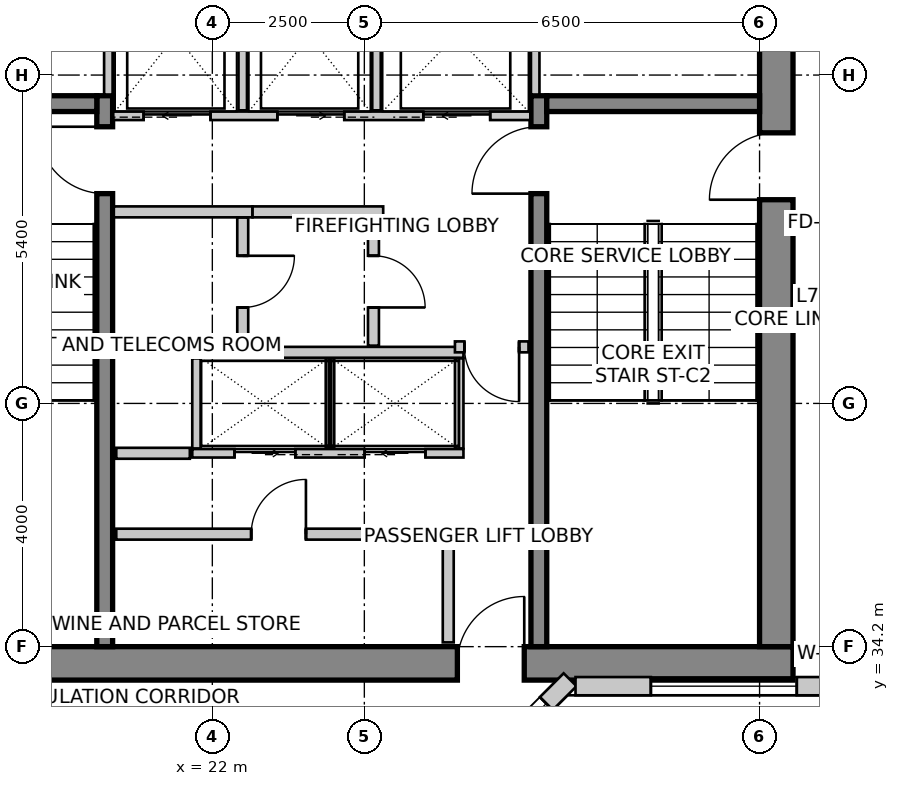
"""IFC4 building model, lengths in metres.
Left out: names, types, materials, properties, quantities, classifications, styles, units other than length and angle.
Written with IfcOpenShell. Run it as: python <this file> out.ifc"""

import sys

from ifc_helpers import new_model, si_unit, direction, frame, frame_2d, origin, place, context, subcontext, project, spatial, rectangle, extrude, source, transform, mapped, element, fill, save


model = new_model("IFC4")
c1 = context("Model", 3, precision=1e-05, world=origin(), true_north=direction((0.0, 1.0)))
c2 = subcontext(c1, "Body", "Model", "MODEL_VIEW")
j1 = project(units=[si_unit("LENGTHUNIT", "METRE"), si_unit("PLANEANGLEUNIT", "RADIAN")], contexts=[c1])
p1 = place(None, origin())
s1 = spatial("IfcSite", under=j1, at=p1, CompositionType="ELEMENT")
p2 = place(p1, origin())
s2 = spatial("IfcBuilding", under=s1, at=p2, CompositionType="ELEMENT")
p3 = place(p2, frame((0.0, 0.0, 288.9)))
s3 = spatial("IfcBuildingStorey", under=s2, at=p3, CompositionType="ELEMENT", Elevation=288.9)
p4 = place(p3, frame((16.05, 33.925, 0.0), z_axis=(0.0, 0.0, 1.0), x_axis=(1.0, 0.0, 0.0)))
e1 = element("IfcWall", 1, at=p4, inside=s3, PredefinedType="SHEAR", context=c2, shape_type="SweptSolid", body=[
    extrude(rectangle(XDim=15.5, YDim=0.55, at=frame_2d((7.75, 0.0))), origin(), (0.0, 0.0, 1.0), 3.6),
])
m1 = source(origin(), c2, "Body", "SweptSolid", [
    extrude(rectangle(XDim=1.1, YDim=2.15, at=frame_2d((0.55, 1.075))), frame((0.0, 0.285, 0.0), z_axis=(0.0, -1.0, 0.0), x_axis=(1.0, 0.0, 0.0)), (0.0, 0.0, 1.0), 0.57),
])
p5 = place(p4, frame((9.98, 0.0, 0.0)))
e2 = element("IfcOpeningElement", 2, at=p5, cuts=e1, PredefinedType="OPENING", context=c2, shape_type="MappedRepresentation", body=[
    mapped(m1, transform((0.0, 0.0, 0.0), scale=1.0)),
])
p6 = place(p3, frame((31.275, 34.2, 0.0), z_axis=(0.0, 0.0, 1.0), x_axis=(0.0, 1.0, 0.0)))
e3 = element("IfcWall", 3, at=p6, inside=s3, PredefinedType="SHEAR", context=c2, shape_type="SweptSolid", body=[
    extrude(rectangle(XDim=11.4, YDim=0.55, at=frame_2d((5.7, 0.0))), origin(), (0.0, 0.0, 1.0), 3.6),
])
p7 = place(p6, frame((7.35, 0.0, 0.0)))
e4 = element("IfcOpeningElement", 4, at=p7, cuts=e3, PredefinedType="OPENING", context=c2, shape_type="MappedRepresentation", body=[
    mapped(m1, transform((0.0, 0.0, 0.0), scale=1.0)),
])
p8 = place(p3, frame((20.23, 34.2, 0.0), z_axis=(0.0, 0.0, 1.0), x_axis=(0.0, 1.0, 0.0)))
e5 = element("IfcWall", 5, at=p8, inside=s3, PredefinedType="SHEAR", context=c2, shape_type="SweptSolid", body=[
    extrude(rectangle(XDim=9.06, YDim=0.26, at=frame_2d((4.53, 0.0))), origin(), (0.0, 0.0, 1.0), 3.6),
])
m2 = source(origin(), c2, "Body", "SweptSolid", [
    extrude(rectangle(XDim=1.1, YDim=2.15, at=frame_2d((0.55, 1.075))), frame((0.0, 0.14, 0.0), z_axis=(0.0, -1.0, 0.0), x_axis=(1.0, 0.0, 0.0)), (0.0, 0.0, 1.0), 0.28),
])
p9 = place(p8, frame((7.45, 0.0, 0.0)))
e6 = element("IfcOpeningElement", 6, at=p9, cuts=e5, PredefinedType="OPENING", context=c2, shape_type="MappedRepresentation", body=[
    mapped(m2, transform((0.0, 0.0, 0.0), scale=1.0)),
])
p10 = place(p3, frame((27.37, 34.2, 0.0), z_axis=(0.0, 0.0, 1.0), x_axis=(0.0, 1.0, 0.0)))
e7 = element("IfcWall", 7, at=p10, inside=s3, PredefinedType="SHEAR", context=c2, shape_type="SweptSolid", body=[
    extrude(rectangle(XDim=9.06, YDim=0.26, at=frame_2d((4.53, 0.0))), origin(), (0.0, 0.0, 1.0), 3.6),
])
p11 = place(p10, frame((7.45, 0.0, 0.0)))
e8 = element("IfcOpeningElement", 8, at=p11, cuts=e7, PredefinedType="OPENING", context=c2, shape_type="MappedRepresentation", body=[
    mapped(m2, transform((0.0, 0.0, 0.0), scale=1.0)),
])
for number, where, z_axis, x_axis in (
    (9, (16.6, 43.13, 0.0), (0.0, 0.0, 1.0), (1.0, 0.0, 0.0)),
    (10, (27.5, 43.13, 0.0), (0.0, 0.0, 1.0), (1.0, 0.0, 0.0)),
):
    element("IfcWall", number, at=place(p3, frame(where, z_axis=z_axis, x_axis=x_axis)), inside=s3, PredefinedType="SHEAR", context=c2, shape_type="SweptSolid", body=[
        extrude(rectangle(XDim=3.5, YDim=0.26, at=frame_2d((1.75, 0.0))), origin(), (0.0, 0.0, 1.0), 3.6),
    ])
p12 = place(p3, frame((25.828, 31.6, 0.0), z_axis=(0.0, 0.0, 1.0), x_axis=(0.707106781187, 0.707106781187, 0.0)))
e11 = element("IfcWall", 11, at=p12, inside=s3, PredefinedType="SOLIDWALL", context=c2, shape_type="SweptSolid", body=[
    extrude(rectangle(XDim=2.907, YDim=0.3, at=frame_2d((1.454, 0.0))), origin(), (0.0, 0.0, 1.0), 3.35),
])
m3 = source(origin(), c2, "Body", "SweptSolid", [
    extrude(rectangle(XDim=1.8, YDim=2.1, at=frame_2d((0.9, 1.05))), frame((0.0, 0.16, 0.0), z_axis=(0.0, -1.0, 0.0), x_axis=(1.0, 0.0, 0.0)), (0.0, 0.0, 1.0), 0.32),
])
p13 = place(p12, frame((0.554, 0.0, 0.85)))
e12 = element("IfcOpeningElement", 12, at=p13, cuts=e11, PredefinedType="OPENING", context=c2, shape_type="MappedRepresentation", body=[
    mapped(m3, transform((0.0, 0.0, 0.0), scale=1.0)),
])
p14 = place(p3, frame((27.973, 33.55, 0.0), z_axis=(0.0, 0.0, 1.0), x_axis=(1.0, 0.0, 0.0)))
e13 = element("IfcWall", 13, at=p14, inside=s3, PredefinedType="SOLIDWALL", context=c2, shape_type="SweptSolid", body=[
    extrude(rectangle(XDim=9.115, YDim=0.3, at=frame_2d((4.558, 0.0))), origin(), (0.0, 0.0, 1.0), 3.35),
])
m4 = source(origin(), c2, "Body", "SweptSolid", [
    extrude(rectangle(XDim=2.4, YDim=2.2, at=frame_2d((1.2, 1.1))), frame((0.0, 0.16, 0.0), z_axis=(0.0, -1.0, 0.0), x_axis=(1.0, 0.0, 0.0)), (0.0, 0.0, 1.0), 0.32),
])
p15 = place(p14, frame((1.239, 0.0, 0.85)))
e14 = element("IfcOpeningElement", 14, at=p15, cuts=e13, PredefinedType="OPENING", context=c2, shape_type="MappedRepresentation", body=[
    mapped(m4, transform((0.0, 0.0, 0.0), scale=1.0)),
])
m5 = source(origin(), c2, "Body", "SweptSolid", [
    extrude(rectangle(XDim=2.1, YDim=2.0, at=frame_2d((1.05, 1.0))), frame((0.0, 0.16, 0.0), z_axis=(0.0, -1.0, 0.0), x_axis=(1.0, 0.0, 0.0)), (0.0, 0.0, 1.0), 0.32),
])
p16 = place(p14, frame((5.626, 0.0, 0.85)))
e15 = element("IfcOpeningElement", 15, at=p16, cuts=e13, PredefinedType="OPENING", context=c2, shape_type="MappedRepresentation", body=[
    mapped(m5, transform((0.0, 0.0, 0.0), scale=1.0)),
])
p17 = place(p3, frame((20.37, 42.93, 0.0), z_axis=(0.0, 0.0, 1.0), x_axis=(1.0, 0.0, 0.0)))
e16 = element("IfcWall", 16, at=p17, inside=s3, PredefinedType="SOLIDWALL", context=c2, shape_type="SweptSolid", body=[
    extrude(rectangle(XDim=6.86, YDim=0.14, at=frame_2d((3.43, 0.0))), origin(), (0.0, 0.0, 1.0), 3.35),
])
m6 = source(origin(), c2, "Body", "SweptSolid", [
    extrude(rectangle(XDim=1.1, YDim=2.15, at=frame_2d((0.55, 1.075))), frame((0.0, 0.08, 0.0), z_axis=(0.0, -1.0, 0.0), x_axis=(1.0, 0.0, 0.0)), (0.0, 0.0, 1.0), 0.16),
])
p18 = place(p17, frame((0.5, 0.0, 0.0)))
e17 = element("IfcOpeningElement", 17, at=p18, cuts=e16, PredefinedType="OPENING", context=c2, shape_type="MappedRepresentation", body=[
    mapped(m6, transform((0.0, 0.0, 0.0), scale=1.0)),
])
p19 = place(p17, frame((2.7, 0.0, 0.0)))
e18 = element("IfcOpeningElement", 18, at=p19, cuts=e16, PredefinedType="OPENING", context=c2, shape_type="MappedRepresentation", body=[
    mapped(m6, transform((0.0, 0.0, 0.0), scale=1.0)),
])
p20 = place(p17, frame((5.1, 0.0, 0.0)))
e19 = element("IfcOpeningElement", 19, at=p20, cuts=e16, PredefinedType="OPENING", context=c2, shape_type="MappedRepresentation", body=[
    mapped(m6, transform((0.0, 0.0, 0.0), scale=1.0)),
])
for number, where, z_axis, x_axis in (
    (20, (20.29, 43.28, 0.0), (0.0, 0.0, 1.0), (0.0, 1.0, 0.0)),
    (21, (27.31, 43.28, 0.0), (0.0, 0.0, 1.0), (0.0, 1.0, 0.0)),
):
    element("IfcWall", number, at=place(p3, frame(where, z_axis=z_axis, x_axis=x_axis)), inside=s3, PredefinedType="SOLIDWALL", context=c2, shape_type="SweptSolid", body=[
        extrude(rectangle(XDim=2.3, YDim=0.14, at=frame_2d((1.15, 0.0))), origin(), (0.0, 0.0, 1.0), 3.35),
    ])
for number, where, z_axis, x_axis in (
    (22, (22.5, 43.02, 0.0), (0.0, 0.0, 1.0), (0.0, 1.0, 0.0)),
    (23, (24.7, 43.02, 0.0), (0.0, 0.0, 1.0), (0.0, 1.0, 0.0)),
):
    element("IfcWall", number, at=place(p3, frame(where, z_axis=z_axis, x_axis=x_axis)), inside=s3, PredefinedType="SOLIDWALL", context=c2, shape_type="SweptSolid", body=[
        extrude(rectangle(XDim=2.56, YDim=0.14, at=frame_2d((1.28, 0.0))), origin(), (0.0, 0.0, 1.0), 3.35),
    ])
p21 = place(p3, frame((21.67, 37.38, 0.0), z_axis=(0.0, 0.0, 1.0), x_axis=(1.0, 0.0, 0.0)))
e24 = element("IfcWall", 24, at=p21, inside=s3, PredefinedType="SOLIDWALL", context=c2, shape_type="SweptSolid", body=[
    extrude(rectangle(XDim=4.46, YDim=0.14, at=frame_2d((2.23, 0.0))), origin(), (0.0, 0.0, 1.0), 3.35),
])
m7 = source(origin(), c2, "Body", "SweptSolid", [
    extrude(rectangle(XDim=1.0, YDim=2.15, at=frame_2d((0.5, 1.075))), frame((0.0, 0.08, 0.0), z_axis=(0.0, -1.0, 0.0), x_axis=(1.0, 0.0, 0.0)), (0.0, 0.0, 1.0), 0.16),
])
p22 = place(p21, frame((0.695, 0.0, 0.0)))
e25 = element("IfcOpeningElement", 25, at=p22, cuts=e24, PredefinedType="OPENING", context=c2, shape_type="MappedRepresentation", body=[
    mapped(m7, transform((0.0, 0.0, 0.0), scale=1.0)),
])
p23 = place(p21, frame((2.835, 0.0, 0.0)))
e26 = element("IfcOpeningElement", 26, at=p23, cuts=e24, PredefinedType="OPENING", context=c2, shape_type="MappedRepresentation", body=[
    mapped(m7, transform((0.0, 0.0, 0.0), scale=1.0)),
])
p24 = place(p3, frame((21.67, 39.04, 0.0), z_axis=(0.0, 0.0, 1.0), x_axis=(1.0, 0.0, 0.0)))
e27 = element("IfcWall", 27, at=p24, inside=s3, PredefinedType="SOLIDWALL", context=c2, shape_type="SweptSolid", body=[
    extrude(rectangle(XDim=4.46, YDim=0.18, at=frame_2d((2.23, 0.0))), origin(), (0.0, 0.0, 1.0), 3.35),
])
for number, where, z_axis, x_axis in (
    (28, (26.06, 37.46, 0.0), (0.0, 0.0, 1.0), (0.0, 1.0, 0.0)),
    (29, (21.74, 37.46, 0.0), (0.0, 0.0, 1.0), (0.0, 1.0, 0.0)),
    (30, (23.935, 37.46, 0.0), (0.0, 0.0, 1.0), (0.0, 1.0, 0.0)),
):
    element("IfcWall", number, at=place(p3, frame(where, z_axis=z_axis, x_axis=x_axis)), inside=s3, PredefinedType="SOLIDWALL", context=c2, shape_type="SweptSolid", body=[
        extrude(rectangle(XDim=1.48, YDim=0.14, at=frame_2d((0.74, 0.0))), origin(), (0.0, 0.0, 1.0), 3.35),
    ])
p25 = place(p3, frame((22.66, 41.35, 0.0), z_axis=(0.0, 0.0, 1.0), x_axis=(-1.0, 0.0, 0.0)))
e31 = element("IfcWall", 31, at=p25, inside=s3, PredefinedType="PARTITIONING", context=c2, shape_type="SweptSolid", body=[
    extrude(rectangle(XDim=2.28, YDim=0.18, at=frame_2d((1.14, 0.0))), origin(), (0.0, 0.0, 1.0), 3.35),
])
p26 = place(p3, frame((24.81, 41.35, 0.0), z_axis=(0.0, 0.0, 1.0), x_axis=(-1.0, 0.0, 0.0)))
e32 = element("IfcWall", 32, at=p26, inside=s3, PredefinedType="PARTITIONING", context=c2, shape_type="SweptSolid", body=[
    extrude(rectangle(XDim=2.148, YDim=0.18, at=frame_2d((1.074, 0.0))), origin(), (0.0, 0.0, 1.0), 3.35),
])
p27 = place(p3, frame((22.5, 41.256, 0.0), z_axis=(0.0, 0.0, 1.0), x_axis=(0.0, -1.0, 0.0)))
e33 = element("IfcWall", 33, at=p27, inside=s3, PredefinedType="PARTITIONING", context=c2, shape_type="SweptSolid", body=[
    extrude(rectangle(XDim=2.106, YDim=0.18, at=frame_2d((1.053, 0.0))), origin(), (0.0, 0.0, 1.0), 3.35),
])
m8 = source(origin(), c2, "Body", "SweptSolid", [
    extrude(rectangle(XDim=0.85, YDim=2.15, at=frame_2d((0.425, 1.075))), frame((0.0, 0.1, 0.0), z_axis=(0.0, -1.0, 0.0), x_axis=(1.0, 0.0, 0.0)), (0.0, 0.0, 1.0), 0.2),
])
p28 = place(p27, frame((0.628, 0.0, 0.0)))
e34 = element("IfcOpeningElement", 34, at=p28, cuts=e33, PredefinedType="OPENING", context=c2, shape_type="MappedRepresentation", body=[
    mapped(m8, transform((0.0, 0.0, 0.0), scale=1.0)),
])
p29 = place(p3, frame((21.63, 37.38, 0.0), z_axis=(0.0, 0.0, 1.0), x_axis=(-1.0, 0.0, 0.0)))
e35 = element("IfcWall", 35, at=p29, inside=s3, PredefinedType="PARTITIONING", context=c2, shape_type="SweptSolid", body=[
    extrude(rectangle(XDim=1.21, YDim=0.18, at=frame_2d((0.605, 0.0))), origin(), (0.0, 0.0, 1.0), 3.35),
])
p30 = place(p3, frame((24.65, 41.256, 0.0), z_axis=(0.0, 0.0, 1.0), x_axis=(0.0, -1.0, 0.0)))
e36 = element("IfcWall", 36, at=p30, inside=s3, PredefinedType="PARTITIONING", context=c2, shape_type="SweptSolid", body=[
    extrude(rectangle(XDim=2.106, YDim=0.18, at=frame_2d((1.053, 0.0))), origin(), (0.0, 0.0, 1.0), 3.35),
])
p31 = place(p30, frame((0.628, 0.0, 0.0)))
e37 = element("IfcOpeningElement", 37, at=p31, cuts=e36, PredefinedType="OPENING", context=c2, shape_type="MappedRepresentation", body=[
    mapped(m8, transform((0.0, 0.0, 0.0), scale=1.0)),
])
p32 = place(p3, frame((27.2, 39.13, 0.0), z_axis=(0.0, 0.0, 1.0), x_axis=(-1.0, 0.0, 0.0)))
e38 = element("IfcWall", 38, at=p32, inside=s3, PredefinedType="PARTITIONING", context=c2, shape_type="SweptSolid", body=[
    extrude(rectangle(XDim=1.21, YDim=0.18, at=frame_2d((0.605, 0.0))), origin(), (0.0, 0.0, 1.0), 3.35),
])
m9 = source(origin(), c2, "Body", "SweptSolid", [
    extrude(rectangle(XDim=0.9, YDim=2.15, at=frame_2d((0.45, 1.075))), frame((0.0, 0.1, 0.0), z_axis=(0.0, -1.0, 0.0), x_axis=(1.0, 0.0, 0.0)), (0.0, 0.0, 1.0), 0.2),
])
p33 = place(p32, frame((0.155, 0.0, 0.0)))
e39 = element("IfcOpeningElement", 39, at=p33, cuts=e38, PredefinedType="OPENING", context=c2, shape_type="MappedRepresentation", body=[
    mapped(m9, transform((0.0, 0.0, 0.0), scale=1.0)),
])
p34 = place(p3, frame((20.42, 36.05, 0.0), z_axis=(0.0, 0.0, 1.0), x_axis=(1.0, 0.0, 0.0)))
e40 = element("IfcWall", 40, at=p34, inside=s3, PredefinedType="PARTITIONING", context=c2, shape_type="SweptSolid", body=[
    extrude(rectangle(XDim=5.46, YDim=0.18, at=frame_2d((2.73, 0.0))), origin(), (0.0, 0.0, 1.0), 3.35),
])
p35 = place(p34, frame((2.219, 0.0, 0.0)))
e41 = element("IfcOpeningElement", 41, at=p35, cuts=e40, PredefinedType="OPENING", context=c2, shape_type="MappedRepresentation", body=[
    mapped(m9, transform((0.0, 0.0, 0.0), scale=1.0)),
])
p36 = place(p3, frame((25.88, 35.956, 0.0), z_axis=(0.0, 0.0, 1.0), x_axis=(0.0, -1.0, 0.0)))
e42 = element("IfcWall", 42, at=p36, inside=s3, PredefinedType="PARTITIONING", context=c2, shape_type="SweptSolid", body=[
    extrude(rectangle(XDim=1.686, YDim=0.18, at=frame_2d((0.843, 0.0))), origin(), (0.0, 0.0, 1.0), 2.642),
])
m10 = source(origin(), c2, "Body", "SweptSolid", [
    extrude(rectangle(XDim=1.8, YDim=2.1, at=frame_2d((0.9, 1.05))), frame((0.0, -0.015, 0.0), z_axis=(0.0, -1.0, 0.0), x_axis=(1.0, 0.0, 0.0)), (0.0, 0.0, 1.0), 0.06),
])
p37 = place(p13, origin())
e43 = element("IfcWindow", 43, at=p37, inside=s3, PartitioningType="SINGLE_PANEL", PredefinedType="WINDOW", context=c2, shape_type="MappedRepresentation", body=[
    mapped(m10, transform((0.0, 0.0, 0.0), scale=1.0)),
])
fill(e12, e43)
m11 = source(origin(), c2, "Body", "SweptSolid", [
    extrude(rectangle(XDim=2.4, YDim=2.2, at=frame_2d((1.2, 1.1))), frame((0.0, -0.015, 0.0), z_axis=(0.0, -1.0, 0.0), x_axis=(1.0, 0.0, 0.0)), (0.0, 0.0, 1.0), 0.06),
])
p38 = place(p15, origin())
e44 = element("IfcWindow", 44, at=p38, inside=s3, PartitioningType="SINGLE_PANEL", PredefinedType="WINDOW", context=c2, shape_type="MappedRepresentation", body=[
    mapped(m11, transform((0.0, 0.0, 0.0), scale=1.0)),
])
fill(e14, e44)
m12 = source(origin(), c2, "Body", "SweptSolid", [
    extrude(rectangle(XDim=1.1, YDim=2.15, at=frame_2d((0.55, 1.075))), frame((0.0, 0.025, 0.0), z_axis=(0.0, -1.0, 0.0), x_axis=(1.0, 0.0, 0.0)), (0.0, 0.0, 1.0), 0.05),
])
p39 = place(p18, origin())
e45 = element("IfcDoor", 45, at=p39, inside=s3, OperationType="SLIDING_TO_LEFT", PredefinedType="DOOR", context=c2, shape_type="MappedRepresentation", body=[
    mapped(m12, transform((0.0, 0.0, 0.0), scale=1.0)),
])
fill(e17, e45)
p40 = place(p19, origin())
e46 = element("IfcDoor", 46, at=p40, inside=s3, OperationType="SLIDING_TO_RIGHT", PredefinedType="DOOR", context=c2, shape_type="MappedRepresentation", body=[
    mapped(m12, transform((0.0, 0.0, 0.0), scale=1.0)),
])
fill(e18, e46)
m13 = source(origin(), c2, "Body", "SweptSolid", [
    extrude(rectangle(XDim=1.1, YDim=2.15, at=frame_2d((0.55, 1.075))), frame((0.0, 0.025, 0.0), z_axis=(0.0, -1.0, 0.0), x_axis=(1.0, 0.0, 0.0)), (0.0, 0.0, 1.0), 0.05),
])
p41 = place(p20, origin())
e47 = element("IfcDoor", 47, at=p41, inside=s3, OperationType="SLIDING_TO_LEFT", PredefinedType="DOOR", context=c2, shape_type="MappedRepresentation", body=[
    mapped(m13, transform((0.0, 0.0, 0.0), scale=1.0)),
])
fill(e19, e47)
m14 = source(origin(), c2, "Body", "SweptSolid", [
    extrude(rectangle(XDim=1.0, YDim=2.15, at=frame_2d((0.5, 1.075))), frame((0.0, 0.025, 0.0), z_axis=(0.0, -1.0, 0.0), x_axis=(1.0, 0.0, 0.0)), (0.0, 0.0, 1.0), 0.05),
])
p42 = place(p22, origin())
e48 = element("IfcDoor", 48, at=p42, inside=s3, OperationType="SLIDING_TO_RIGHT", PredefinedType="DOOR", context=c2, shape_type="MappedRepresentation", body=[
    mapped(m14, transform((0.0, 0.0, 0.0), scale=1.0)),
])
fill(e25, e48)
p43 = place(p23, origin())
e49 = element("IfcDoor", 49, at=p43, inside=s3, OperationType="SLIDING_TO_LEFT", PredefinedType="DOOR", context=c2, shape_type="MappedRepresentation", body=[
    mapped(m14, transform((0.0, 0.0, 0.0), scale=1.0)),
])
fill(e26, e49)
m15 = source(origin(), c2, "Body", "SweptSolid", [
    extrude(rectangle(XDim=1.1, YDim=2.15, at=frame_2d((0.55, 1.075))), frame((0.0, 0.025, 0.0), z_axis=(0.0, -1.0, 0.0), x_axis=(1.0, 0.0, 0.0)), (0.0, 0.0, 1.0), 0.05),
])
p44 = place(p9, origin())
e50 = element("IfcDoor", 50, at=p44, inside=s3, OperationType="SINGLE_SWING_RIGHT", PredefinedType="DOOR", context=c2, shape_type="MappedRepresentation", body=[
    mapped(m15, transform((0.0, 0.0, 0.0), scale=1.0)),
])
fill(e6, e50)
p45 = place(p11, origin())
e51 = element("IfcDoor", 51, at=p45, inside=s3, OperationType="SINGLE_SWING_LEFT", PredefinedType="DOOR", context=c2, shape_type="MappedRepresentation", body=[
    mapped(m15, transform((0.0, 0.0, 0.0), scale=1.0)),
])
fill(e8, e51)
p46 = place(p7, origin())
e52 = element("IfcDoor", 52, at=p46, inside=s3, OperationType="SINGLE_SWING_LEFT", PredefinedType="DOOR", context=c2, shape_type="MappedRepresentation", body=[
    mapped(m15, transform((0.0, 0.0, 0.0), scale=1.0)),
])
fill(e4, e52)
p47 = place(p5, origin())
e53 = element("IfcDoor", 53, at=p47, inside=s3, OperationType="SINGLE_SWING_RIGHT", PredefinedType="DOOR", context=c2, shape_type="MappedRepresentation", body=[
    mapped(m15, transform((0.0, 0.0, 0.0), scale=1.0)),
])
fill(e2, e53)
m16 = source(origin(), c2, "Body", "SweptSolid", [
    extrude(rectangle(XDim=0.85, YDim=2.15, at=frame_2d((0.425, 1.075))), frame((0.0, 0.025, 0.0), z_axis=(0.0, -1.0, 0.0), x_axis=(1.0, 0.0, 0.0)), (0.0, 0.0, 1.0), 0.05),
])
p48 = place(p28, origin())
e54 = element("IfcDoor", 54, at=p48, inside=s3, OperationType="SINGLE_SWING_LEFT", PredefinedType="DOOR", context=c2, shape_type="MappedRepresentation", body=[
    mapped(m16, transform((0.0, 0.0, 0.0), scale=1.0)),
])
fill(e34, e54)
p49 = place(p31, origin())
e55 = element("IfcDoor", 55, at=p49, inside=s3, OperationType="SINGLE_SWING_RIGHT", PredefinedType="DOOR", context=c2, shape_type="MappedRepresentation", body=[
    mapped(m16, transform((0.0, 0.0, 0.0), scale=1.0)),
])
fill(e37, e55)
m17 = source(origin(), c2, "Body", "SweptSolid", [
    extrude(rectangle(XDim=0.9, YDim=2.15, at=frame_2d((0.45, 1.075))), frame((0.0, 0.025, 0.0), z_axis=(0.0, -1.0, 0.0), x_axis=(1.0, 0.0, 0.0)), (0.0, 0.0, 1.0), 0.05),
])
p50 = place(p33, origin())
e56 = element("IfcDoor", 56, at=p50, inside=s3, OperationType="SINGLE_SWING_LEFT", PredefinedType="DOOR", context=c2, shape_type="MappedRepresentation", body=[
    mapped(m17, transform((0.0, 0.0, 0.0), scale=1.0)),
])
fill(e39, e56)
p51 = place(p35, origin())
e57 = element("IfcDoor", 57, at=p51, inside=s3, OperationType="SINGLE_SWING_RIGHT", PredefinedType="DOOR", context=c2, shape_type="MappedRepresentation", body=[
    mapped(m17, transform((0.0, 0.0, 0.0), scale=1.0)),
])
fill(e41, e57)
save(model, sys.argv[1])
